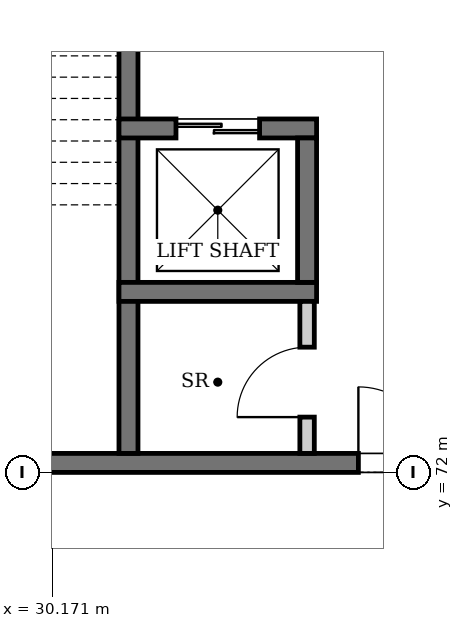
"""IFC4 building model, lengths in metres.
Left out: names, types, materials, properties, quantities, classifications, styles, units other than length and angle.
Written with IfcOpenShell. Run it as: python <this file> out.ifc"""

import sys

from ifc_helpers import new_model, si_unit, direction, frame, frame_2d, origin, place, context, subcontext, project, spatial, rectangle, extrude, element, fill, save


model = new_model("IFC4")
c1 = context("Model", 3, precision=1e-05, world=origin(), true_north=direction((0.0, 1.0)))
c2 = subcontext(c1, "Body", "Model", "MODEL_VIEW")
j1 = project(units=[si_unit("LENGTHUNIT", "METRE"), si_unit("PLANEANGLEUNIT", "RADIAN")], contexts=[c1])
p1 = place(None, origin())
s1 = spatial("IfcSite", under=j1, at=p1, CompositionType="ELEMENT")
p2 = place(p1, origin())
s2 = spatial("IfcBuilding", under=s1, at=p2, CompositionType="ELEMENT")
p3 = place(p2, frame((0.0, 0.0, 10.5)))
s3 = spatial("IfcBuildingStorey", under=s2, at=p3, CompositionType="ELEMENT", Elevation=10.5)
p4 = place(p3, frame((27.25, 72.125, 0.0), z_axis=(0.0, 0.0, 1.0), x_axis=(1.0, 0.0, 0.0)))
e1 = element("IfcWall", 1, at=p4, inside=s3, PredefinedType="SHEAR", context=c2, shape_type="SweptSolid", body=[
    extrude(rectangle(XDim=8.5, YDim=0.25, at=frame_2d((4.25, 0.0))), origin(), (0.0, 0.0, 1.0), 4.35),
])
p5 = place(p4, frame((6.95, 0.0, 0.0)))
e2 = element("IfcOpeningElement", 2, at=p5, cuts=e1, PredefinedType="OPENING", context=c2, shape_type="SweptSolid", body=[
    extrude(rectangle(XDim=1.0, YDim=2.1, at=frame_2d((0.5, 1.05))), frame((0.0, 0.135, 0.0), z_axis=(0.0, -1.0, 0.0), x_axis=(1.0, 0.0, 0.0)), (0.0, 0.0, 1.0), 0.27),
])
p6 = place(p3, frame((31.175, 80.4, 0.0), z_axis=(0.0, 0.0, 1.0), x_axis=(0.0, -1.0, 0.0)))
e3 = element("IfcWall", 3, at=p6, inside=s3, PredefinedType="SOLIDWALL", context=c2, shape_type="SweptSolid", body=[
    extrude(rectangle(XDim=8.15, YDim=0.25, at=frame_2d((4.075, 0.0))), origin(), (0.0, 0.0, 1.0), 4.35),
])
p7 = place(p6, frame((0.4, 0.0, 0.0)))
e4 = element("IfcOpeningElement", 4, at=p7, cuts=e3, PredefinedType="OPENING", context=c2, shape_type="SweptSolid", body=[
    extrude(rectangle(XDim=1.0, YDim=2.1, at=frame_2d((0.5, 1.05))), frame((0.0, 0.135, 0.0), z_axis=(0.0, -1.0, 0.0), x_axis=(1.0, 0.0, 0.0)), (0.0, 0.0, 1.0), 0.27),
])
p8 = place(p3, frame((31.05, 74.375, 0.0), z_axis=(0.0, 0.0, 1.0), x_axis=(1.0, 0.0, 0.0)))
e5 = element("IfcWall", 5, at=p8, inside=s3, PredefinedType="SOLIDWALL", context=c2, shape_type="SweptSolid", body=[
    extrude(rectangle(XDim=2.6, YDim=0.25, at=frame_2d((1.3, 0.0))), origin(), (0.0, 0.0, 1.0), 4.35),
])
p9 = place(p3, frame((31.05, 76.525, 0.0), z_axis=(0.0, 0.0, 1.0), x_axis=(1.0, 0.0, 0.0)))
e6 = element("IfcWall", 6, at=p9, inside=s3, PredefinedType="SOLIDWALL", context=c2, shape_type="SweptSolid", body=[
    extrude(rectangle(XDim=2.6, YDim=0.25, at=frame_2d((1.3, 0.0))), origin(), (0.0, 0.0, 1.0), 4.35),
])
p10 = place(p9, frame((0.75, 0.0, 0.0)))
e7 = element("IfcOpeningElement", 7, at=p10, cuts=e6, PredefinedType="OPENING", context=c2, shape_type="SweptSolid", body=[
    extrude(rectangle(XDim=1.1, YDim=2.1, at=frame_2d((0.55, 1.05))), frame((0.0, 0.135, 0.0), z_axis=(0.0, -1.0, 0.0), x_axis=(1.0, 0.0, 0.0)), (0.0, 0.0, 1.0), 0.27),
])
p11 = place(p3, frame((33.525, 74.5, 0.0), z_axis=(0.0, 0.0, 1.0), x_axis=(0.0, 1.0, 0.0)))
e8 = element("IfcWall", 8, at=p11, inside=s3, PredefinedType="SOLIDWALL", context=c2, shape_type="SweptSolid", body=[
    extrude(rectangle(XDim=1.9, YDim=0.25, at=frame_2d((0.95, 0.0))), origin(), (0.0, 0.0, 1.0), 4.35),
])
p12 = place(p3, frame((33.525, 72.25, 0.0), z_axis=(0.0, 0.0, 1.0), x_axis=(0.0, 1.0, 0.0)))
e9 = element("IfcWall", 9, at=p12, inside=s3, PredefinedType="PARTITIONING", context=c2, shape_type="SweptSolid", body=[
    extrude(rectangle(XDim=2.0, YDim=0.19, at=frame_2d((1.0, 0.0))), origin(), (0.0, 0.0, 1.0), 4.35),
])
p13 = place(p12, frame((0.478, 0.0, 0.0)))
e10 = element("IfcOpeningElement", 10, at=p13, cuts=e9, PredefinedType="OPENING", context=c2, shape_type="SweptSolid", body=[
    extrude(rectangle(XDim=0.92, YDim=2.1, at=frame_2d((0.46, 1.05))), frame((0.0, 0.105, 0.0), z_axis=(0.0, -1.0, 0.0), x_axis=(1.0, 0.0, 0.0)), (0.0, 0.0, 1.0), 0.21),
])
p14 = place(p10, origin())
e11 = element("IfcDoor", 11, at=p14, inside=s3, OperationType="DOUBLE_DOOR_SLIDING", PredefinedType="DOOR", context=c2, shape_type="SweptSolid", body=[
    extrude(rectangle(XDim=1.1, YDim=2.1, at=frame_2d((0.55, 1.05))), frame((0.0, 0.025, 0.0), z_axis=(0.0, -1.0, 0.0), x_axis=(1.0, 0.0, 0.0)), (0.0, 0.0, 1.0), 0.05),
])
fill(e7, e11)
p15 = place(p5, origin())
e12 = element("IfcDoor", 12, at=p15, inside=s3, OperationType="SINGLE_SWING_LEFT", PredefinedType="DOOR", context=c2, shape_type="SweptSolid", body=[
    extrude(rectangle(XDim=1.0, YDim=2.1, at=frame_2d((0.5, 1.05))), frame((0.0, 0.025, 0.0), z_axis=(0.0, -1.0, 0.0), x_axis=(1.0, 0.0, 0.0)), (0.0, 0.0, 1.0), 0.05),
])
fill(e2, e12)
p16 = place(p13, origin())
e13 = element("IfcDoor", 13, at=p16, inside=s3, OperationType="SINGLE_SWING_LEFT", PredefinedType="DOOR", context=c2, shape_type="SweptSolid", body=[
    extrude(rectangle(XDim=0.92, YDim=2.1, at=frame_2d((0.46, 1.05))), frame((0.0, 0.025, 0.0), z_axis=(0.0, -1.0, 0.0), x_axis=(1.0, 0.0, 0.0)), (0.0, 0.0, 1.0), 0.05),
])
fill(e10, e13)
save(model, sys.argv[1])
